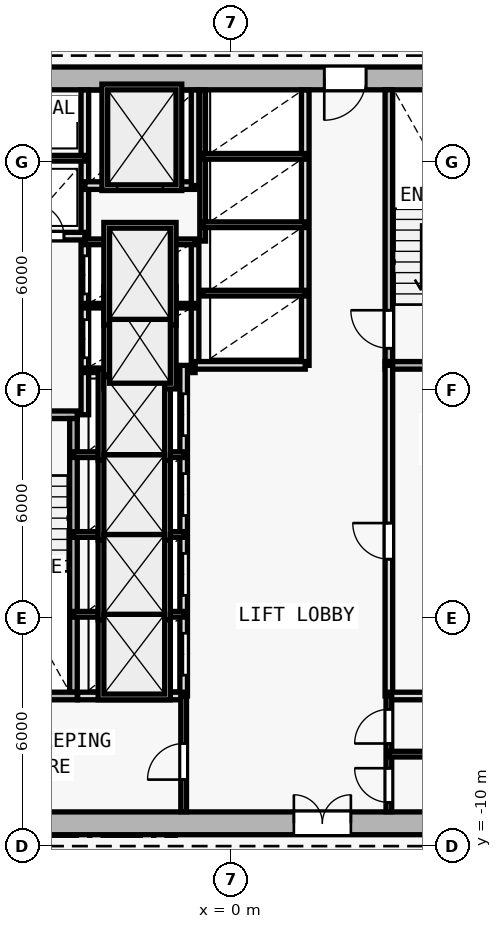
"""IFC4 building model, lengths in metres.
Left out: names, types, materials, properties, quantities, classifications, styles, units other than length and angle.
Written with IfcOpenShell. Run it as: python <this file> out.ifc"""

import sys

from ifc_helpers import new_model, si_unit, direction, frame, frame_2d, origin, origin_2d, place, context, subcontext, project, spatial, rectangle, i_section, extrude, element, fill, save


model = new_model("IFC4")
c1 = context("Model", 3, precision=1e-05, world=origin(), true_north=direction((0.0, 1.0)))
c2 = subcontext(c1, "Body", "Model", "MODEL_VIEW")
j1 = project(units=[si_unit("LENGTHUNIT", "METRE"), si_unit("PLANEANGLEUNIT", "RADIAN")], contexts=[c1])
p1 = place(None, origin())
s1 = spatial("IfcSite", under=j1, at=p1, CompositionType="ELEMENT")
p2 = place(p1, origin())
s2 = spatial("IfcBuilding", under=s1, at=p2, CompositionType="ELEMENT")
p3 = place(p2, frame((0.0, 0.0, 125.7)))
s3 = spatial("IfcBuildingStorey", under=s2, at=p3, CompositionType="ELEMENT", Elevation=125.7)
p4 = place(p3, frame((0.0, -9.4, 0.0), z_axis=(0.0, 0.0, 1.0), x_axis=(1.0, 0.0, 0.0)))
e1 = element("IfcColumn", 1, at=p4, inside=s3, PredefinedType="COLUMN", context=c2, shape_type="SweptSolid", body=[
    extrude(i_section(OverallWidth=0.409, OverallDepth=0.425, WebThickness=0.021, FlangeThickness=0.034, FilletRadius=0.015, at=origin_2d()), origin(), (0.0, 0.0, 1.0), 3.6),
])
p5 = place(p3, frame((-8.0, -9.4, 0.0), z_axis=(0.0, 0.0, 1.0), x_axis=(1.0, 0.0, 0.0)))
e2 = element("IfcWall", 2, at=p5, inside=s3, PredefinedType="SHEAR", context=c2, shape_type="SweptSolid", body=[
    extrude(rectangle(XDim=16.0, YDim=0.6, at=frame_2d((8.0, 0.0))), origin(), (0.0, 0.0, 1.0), 3.28),
])
p6 = place(p5, frame((9.65, 0.0, 0.0)))
e3 = element("IfcOpeningElement", 3, at=p6, cuts=e2, PredefinedType="OPENING", context=c2, shape_type="SweptSolid", body=[
    extrude(rectangle(XDim=1.5, YDim=2.2, at=frame_2d((0.75, 1.1))), frame((0.0, 0.31, 0.0), z_axis=(0.0, -1.0, 0.0), x_axis=(1.0, 0.0, 0.0)), (0.0, 0.0, 1.0), 0.62),
])
p7 = place(p3, frame((8.0, 10.2, 0.0), z_axis=(0.0, 0.0, 1.0), x_axis=(-1.0, 0.0, 0.0)))
e4 = element("IfcWall", 4, at=p7, inside=s3, PredefinedType="SHEAR", context=c2, shape_type="SweptSolid", body=[
    extrude(rectangle(XDim=16.0, YDim=0.6, at=frame_2d((8.0, 0.0))), origin(), (0.0, 0.0, 1.0), 3.28),
])
p8 = place(p7, frame((4.45, 0.0, 0.0)))
e5 = element("IfcOpeningElement", 5, at=p8, cuts=e4, PredefinedType="OPENING", context=c2, shape_type="SweptSolid", body=[
    extrude(rectangle(XDim=1.1, YDim=2.15, at=frame_2d((0.55, 1.075))), frame((0.0, 0.31, 0.0), z_axis=(0.0, -1.0, 0.0), x_axis=(1.0, 0.0, 0.0)), (0.0, 0.0, 1.0), 0.62),
])
p9 = place(p3, frame((-7.4, 1.35, 0.0), z_axis=(0.0, 0.0, 1.0), x_axis=(1.0, 0.0, 0.0)))
e6 = element("IfcWall", 6, at=p9, inside=s3, PredefinedType="SOLIDWALL", context=c2, shape_type="SweptSolid", body=[
    extrude(rectangle(XDim=3.35, YDim=0.2, at=frame_2d((1.675, 0.0))), origin(), (0.0, 0.0, 1.0), 3.28),
])
p10 = place(p9, frame((0.65, 0.0, 0.0)))
e7 = element("IfcOpeningElement", 7, at=p10, cuts=e6, PredefinedType="OPENING", context=c2, shape_type="SweptSolid", body=[
    extrude(rectangle(XDim=1.0, YDim=2.15, at=frame_2d((0.5, 1.075))), frame((0.0, 0.11, 0.0), z_axis=(0.0, -1.0, 0.0), x_axis=(1.0, 0.0, 0.0)), (0.0, 0.0, 1.0), 0.22),
])
p11 = place(p3, frame((-4.15, -5.95, 0.0), z_axis=(0.0, 0.0, 1.0), x_axis=(0.0, 1.0, 0.0)))
e8 = element("IfcWall", 8, at=p11, inside=s3, PredefinedType="SOLIDWALL", context=c2, shape_type="SweptSolid", body=[
    extrude(rectangle(XDim=7.2, YDim=0.2, at=frame_2d((3.6, 0.0))), origin(), (0.0, 0.0, 1.0), 3.28),
])
p12 = place(p3, frame((-3.85, 1.35, 0.0), z_axis=(0.0, 0.0, 1.0), x_axis=(0.0, 1.0, 0.0)))
e9 = element("IfcWall", 9, at=p12, inside=s3, PredefinedType="SOLIDWALL", context=c2, shape_type="SweptSolid", body=[
    extrude(rectangle(XDim=8.545, YDim=0.2, at=frame_2d((4.272, 0.0))), origin(), (0.0, 0.0, 1.0), 3.28),
])
p13 = place(p12, frame((1.5, 0.0, 0.0)))
e10 = element("IfcOpeningElement", 10, at=p13, cuts=e9, PredefinedType="OPENING", context=c2, shape_type="SweptSolid", body=[
    extrude(rectangle(XDim=1.0, YDim=2.15, at=frame_2d((0.5, 1.075))), frame((0.0, 0.11, 0.0), z_axis=(0.0, -1.0, 0.0), x_axis=(1.0, 0.0, 0.0)), (0.0, 0.0, 1.0), 0.22),
])
p14 = place(p12, frame((3.18, 0.0, 0.0)))
e11 = element("IfcOpeningElement", 11, at=p14, cuts=e9, PredefinedType="OPENING", context=c2, shape_type="SweptSolid", body=[
    extrude(rectangle(XDim=1.0, YDim=2.15, at=frame_2d((0.5, 1.075))), frame((0.0, 0.11, 0.0), z_axis=(0.0, -1.0, 0.0), x_axis=(1.0, 0.0, 0.0)), (0.0, 0.0, 1.0), 0.22),
])
p15 = place(p3, frame((-7.395, 6.05, 0.0), z_axis=(0.0, 0.0, 1.0), x_axis=(1.0, 0.0, 0.0)))
e12 = element("IfcWall", 12, at=p15, inside=s3, PredefinedType="SOLIDWALL", context=c2, shape_type="SweptSolid", body=[
    extrude(rectangle(XDim=3.545, YDim=0.2, at=frame_2d((1.772, 0.0))), origin(), (0.0, 0.0, 1.0), 3.28),
])
p16 = place(p15, frame((0.345, 0.0, 0.0)))
e13 = element("IfcOpeningElement", 13, at=p16, cuts=e12, PredefinedType="OPENING", context=c2, shape_type="SweptSolid", body=[
    extrude(rectangle(XDim=0.85, YDim=2.1, at=frame_2d((0.425, 1.05))), frame((0.0, 0.11, 0.0), z_axis=(0.0, -1.0, 0.0), x_axis=(1.0, 0.0, 0.0)), (0.0, 0.0, 1.0), 0.22),
])
p17 = place(p15, frame((2.145, 0.0, 0.0)))
e14 = element("IfcOpeningElement", 14, at=p17, cuts=e12, PredefinedType="OPENING", context=c2, shape_type="SweptSolid", body=[
    extrude(rectangle(XDim=0.85, YDim=2.1, at=frame_2d((0.425, 1.05))), frame((0.0, 0.11, 0.0), z_axis=(0.0, -1.0, 0.0), x_axis=(1.0, 0.0, 0.0)), (0.0, 0.0, 1.0), 0.22),
])
p18 = place(p3, frame((-7.395, 8.1, 0.0), z_axis=(0.0, 0.0, 1.0), x_axis=(1.0, 0.0, 0.0)))
e15 = element("IfcWall", 15, at=p18, inside=s3, PredefinedType="PARTITIONING", context=c2, shape_type="SweptSolid", body=[
    extrude(rectangle(XDim=3.545, YDim=0.15, at=frame_2d((1.772, 0.0))), origin(), (0.0, 0.0, 1.0), 3.28),
])
p19 = place(p3, frame((4.15, 2.75, 0.0), z_axis=(0.0, 0.0, 1.0), x_axis=(0.0, 1.0, 0.0)))
e16 = element("IfcWall", 16, at=p19, inside=s3, PredefinedType="SOLIDWALL", context=c2, shape_type="SweptSolid", body=[
    extrude(rectangle(XDim=7.15, YDim=0.2, at=frame_2d((3.575, 0.0))), origin(), (0.0, 0.0, 1.0), 3.28),
])
p20 = place(p19, frame((0.35, 0.0, 0.0)))
e17 = element("IfcOpeningElement", 17, at=p20, cuts=e16, PredefinedType="OPENING", context=c2, shape_type="SweptSolid", body=[
    extrude(rectangle(XDim=1.0, YDim=2.15, at=frame_2d((0.5, 1.075))), frame((0.0, 0.11, 0.0), z_axis=(0.0, -1.0, 0.0), x_axis=(1.0, 0.0, 0.0)), (0.0, 0.0, 1.0), 0.22),
])
p21 = place(p3, frame((4.05, 2.65, 0.0), z_axis=(0.0, 0.0, 1.0), x_axis=(1.0, 0.0, 0.0)))
e18 = element("IfcWall", 18, at=p21, inside=s3, PredefinedType="SOLIDWALL", context=c2, shape_type="SweptSolid", body=[
    extrude(rectangle(XDim=3.35, YDim=0.2, at=frame_2d((1.675, 0.0))), origin(), (0.0, 0.0, 1.0), 3.28),
])
p22 = place(p3, frame((-0.95, 2.65, 0.0), z_axis=(0.0, 0.0, 1.0), x_axis=(0.0, 1.0, 0.0)))
e19 = element("IfcWall", 19, at=p22, inside=s3, PredefinedType="SOLIDWALL", context=c2, shape_type="SweptSolid", body=[
    extrude(rectangle(XDim=3.27, YDim=0.2, at=frame_2d((1.635, 0.0))), origin(), (0.0, 0.0, 1.0), 3.28),
])
for number, where, z_axis, x_axis in (
    (20, (-3.85, 2.52, 0.0), (0.0, 0.0, 1.0), (1.0, 0.0, 0.0)),
    (21, (-3.85, 4.22, 0.0), (0.0, 0.0, 1.0), (1.0, 0.0, 0.0)),
):
    element("IfcWall", number, at=place(p3, frame(where, z_axis=z_axis, x_axis=x_axis)), inside=s3, PredefinedType="PARTITIONING", context=c2, shape_type="SweptSolid", body=[
        extrude(rectangle(XDim=2.9, YDim=0.12, at=frame_2d((1.45, 0.0))), origin(), (0.0, 0.0, 1.0), 3.28),
    ])
p23 = place(p3, frame((-3.85, 5.9, 0.0), z_axis=(0.0, 0.0, 1.0), x_axis=(1.0, 0.0, 0.0)))
e22 = element("IfcWall", 22, at=p23, inside=s3, PredefinedType="PARTITIONING", context=c2, shape_type="SweptSolid", body=[
    extrude(rectangle(XDim=2.9, YDim=0.15, at=frame_2d((1.45, 0.0))), origin(), (0.0, 0.0, 1.0), 3.28),
])
p24 = place(p3, frame((-3.85, 7.38, 0.0), z_axis=(0.0, 0.0, 1.0), x_axis=(1.0, 0.0, 0.0)))
e23 = element("IfcWall", 23, at=p24, inside=s3, PredefinedType="SOLIDWALL", context=c2, shape_type="SweptSolid", body=[
    extrude(rectangle(XDim=2.9, YDim=0.2, at=frame_2d((1.45, 0.0))), origin(), (0.0, 0.0, 1.0), 3.28),
])
p25 = place(p24, frame((0.85, 0.0, 0.0)))
e24 = element("IfcOpeningElement", 24, at=p25, cuts=e23, PredefinedType="OPENING", context=c2, shape_type="SweptSolid", body=[
    extrude(rectangle(XDim=1.2, YDim=2.2, at=frame_2d((0.6, 1.1))), frame((0.0, 0.11, 0.0), z_axis=(0.0, -1.0, 0.0), x_axis=(1.0, 0.0, 0.0)), (0.0, 0.0, 1.0), 0.22),
])
p26 = place(p3, frame((-0.95, 7.38, 0.0), z_axis=(0.0, 0.0, 1.0), x_axis=(0.0, 1.0, 0.0)))
e25 = element("IfcWall", 25, at=p26, inside=s3, PredefinedType="SOLIDWALL", context=c2, shape_type="SweptSolid", body=[
    extrude(rectangle(XDim=2.515, YDim=0.2, at=frame_2d((1.258, 0.0))), origin(), (0.0, 0.0, 1.0), 3.28),
])
p27 = place(p3, frame((4.15, -6.05, 0.0), z_axis=(0.0, 0.0, 1.0), x_axis=(0.0, 1.0, 0.0)))
e26 = element("IfcWall", 26, at=p27, inside=s3, PredefinedType="SOLIDWALL", context=c2, shape_type="SweptSolid", body=[
    extrude(rectangle(XDim=8.7, YDim=0.2, at=frame_2d((4.35, 0.0))), origin(), (0.0, 0.0, 1.0), 3.28),
])
p28 = place(p27, frame((3.6, 0.0, 0.0)))
e27 = element("IfcOpeningElement", 27, at=p28, cuts=e26, PredefinedType="OPENING", context=c2, shape_type="SweptSolid", body=[
    extrude(rectangle(XDim=0.95, YDim=2.1, at=frame_2d((0.475, 1.05))), frame((0.0, 0.11, 0.0), z_axis=(0.0, -1.0, 0.0), x_axis=(1.0, 0.0, 0.0)), (0.0, 0.0, 1.0), 0.22),
])
p29 = place(p3, frame((-1.25, -6.05, 0.0), z_axis=(0.0, 0.0, 1.0), x_axis=(0.0, 1.0, 0.0)))
e28 = element("IfcWall", 28, at=p29, inside=s3, PredefinedType="SOLIDWALL", context=c2, shape_type="SweptSolid", body=[
    extrude(rectangle(XDim=8.7, YDim=0.2, at=frame_2d((4.35, 0.0))), origin(), (0.0, 0.0, 1.0), 3.28),
])
p30 = place(p29, frame((0.55, 0.0, 0.0)))
e29 = element("IfcOpeningElement", 29, at=p30, cuts=e28, PredefinedType="OPENING", context=c2, shape_type="SweptSolid", body=[
    extrude(rectangle(XDim=1.1, YDim=2.15, at=frame_2d((0.55, 1.075))), frame((0.0, 0.11, 0.0), z_axis=(0.0, -1.0, 0.0), x_axis=(1.0, 0.0, 0.0)), (0.0, 0.0, 1.0), 0.22),
])
p31 = place(p29, frame((2.65, 0.0, 0.0)))
e30 = element("IfcOpeningElement", 30, at=p31, cuts=e28, PredefinedType="OPENING", context=c2, shape_type="SweptSolid", body=[
    extrude(rectangle(XDim=1.1, YDim=2.15, at=frame_2d((0.55, 1.075))), frame((0.0, 0.11, 0.0), z_axis=(0.0, -1.0, 0.0), x_axis=(1.0, 0.0, 0.0)), (0.0, 0.0, 1.0), 0.22),
])
p32 = place(p29, frame((4.75, 0.0, 0.0)))
e31 = element("IfcOpeningElement", 31, at=p32, cuts=e28, PredefinedType="OPENING", context=c2, shape_type="SweptSolid", body=[
    extrude(rectangle(XDim=1.1, YDim=2.15, at=frame_2d((0.55, 1.075))), frame((0.0, 0.11, 0.0), z_axis=(0.0, -1.0, 0.0), x_axis=(1.0, 0.0, 0.0)), (0.0, 0.0, 1.0), 0.22),
])
p33 = place(p29, frame((6.85, 0.0, 0.0)))
e32 = element("IfcOpeningElement", 32, at=p33, cuts=e28, PredefinedType="OPENING", context=c2, shape_type="SweptSolid", body=[
    extrude(rectangle(XDim=1.1, YDim=2.15, at=frame_2d((0.55, 1.075))), frame((0.0, 0.11, 0.0), z_axis=(0.0, -1.0, 0.0), x_axis=(1.0, 0.0, 0.0)), (0.0, 0.0, 1.0), 0.22),
])
for number, where, z_axis, x_axis in (
    (33, (-4.15, -3.9, 0.0), (0.0, 0.0, 1.0), (1.0, 0.0, 0.0)),
    (34, (-4.15, -1.8, 0.0), (0.0, 0.0, 1.0), (1.0, 0.0, 0.0)),
    (35, (-4.15, 0.3, 0.0), (0.0, 0.0, 1.0), (1.0, 0.0, 0.0)),
):
    element("IfcWall", number, at=place(p3, frame(where, z_axis=z_axis, x_axis=x_axis)), inside=s3, PredefinedType="PARTITIONING", context=c2, shape_type="SweptSolid", body=[
        extrude(rectangle(XDim=2.9, YDim=0.15, at=frame_2d((1.45, 0.0))), origin(), (0.0, 0.0, 1.0), 3.28),
    ])
p34 = place(p3, frame((1.95, 2.65, 0.0), z_axis=(0.0, 0.0, 1.0), x_axis=(0.0, 1.0, 0.0)))
e36 = element("IfcWall", 36, at=p34, inside=s3, PredefinedType="SOLIDWALL", context=c2, shape_type="SweptSolid", body=[
    extrude(rectangle(XDim=7.245, YDim=0.2, at=frame_2d((3.623, 0.0))), origin(), (0.0, 0.0, 1.0), 3.28),
])
p35 = place(p3, frame((-0.95, 2.65, 0.0), z_axis=(0.0, 0.0, 1.0), x_axis=(1.0, 0.0, 0.0)))
e37 = element("IfcWall", 37, at=p35, inside=s3, PredefinedType="SOLIDWALL", context=c2, shape_type="SweptSolid", body=[
    extrude(rectangle(XDim=2.9, YDim=0.2, at=frame_2d((1.45, 0.0))), origin(), (0.0, 0.0, 1.0), 3.28),
])
p36 = place(p3, frame((-0.75, 5.92, 0.0), z_axis=(0.0, 0.0, 1.0), x_axis=(0.0, 1.0, 0.0)))
e38 = element("IfcWall", 38, at=p36, inside=s3, PredefinedType="PARTITIONING", context=c2, shape_type="SweptSolid", body=[
    extrude(rectangle(XDim=3.975, YDim=0.15, at=frame_2d((1.988, 0.0))), origin(), (0.0, 0.0, 1.0), 3.28),
])
for number, where, z_axis, x_axis in (
    (39, (-0.75, 4.55, 0.0), (0.0, 0.0, 1.0), (1.0, 0.0, 0.0)),
    (40, (-0.75, 6.35, 0.0), (0.0, 0.0, 1.0), (1.0, 0.0, 0.0)),
    (41, (-0.75, 8.15, 0.0), (0.0, 0.0, 1.0), (1.0, 0.0, 0.0)),
):
    element("IfcWall", number, at=place(p3, frame(where, z_axis=z_axis, x_axis=x_axis)), inside=s3, PredefinedType="PARTITIONING", context=c2, shape_type="SweptSolid", body=[
        extrude(rectangle(XDim=2.7, YDim=0.15, at=frame_2d((1.35, 0.0))), origin(), (0.0, 0.0, 1.0), 3.28),
    ])
p37 = place(p3, frame((-7.4, -6.05, 0.0), z_axis=(0.0, 0.0, 1.0), x_axis=(1.0, 0.0, 0.0)))
e42 = element("IfcWall", 42, at=p37, inside=s3, PredefinedType="SOLIDWALL", context=c2, shape_type="SweptSolid", body=[
    extrude(rectangle(XDim=3.35, YDim=0.2, at=frame_2d((1.675, 0.0))), origin(), (0.0, 0.0, 1.0), 3.28),
])
p38 = place(p3, frame((-4.04, -6.05, 0.0), z_axis=(0.0, 0.0, 1.0), x_axis=(1.0, 0.0, 0.0)))
e43 = element("IfcWall", 43, at=p38, inside=s3, PredefinedType="SOLIDWALL", context=c2, shape_type="SweptSolid", body=[
    extrude(rectangle(XDim=2.79, YDim=0.2, at=frame_2d((1.395, 0.0))), origin(), (0.0, 0.0, 1.0), 3.28),
])
p39 = place(p3, frame((4.15, -6.05, 0.0), z_axis=(0.0, 0.0, 1.0), x_axis=(1.0, 0.0, 0.0)))
e44 = element("IfcWall", 44, at=p39, inside=s3, PredefinedType="SOLIDWALL", context=c2, shape_type="SweptSolid", body=[
    extrude(rectangle(XDim=3.245, YDim=0.2, at=frame_2d((1.623, 0.0))), origin(), (0.0, 0.0, 1.0), 3.28),
])
p40 = place(p3, frame((-1.25, -9.095, 0.0), z_axis=(0.0, 0.0, 1.0), x_axis=(0.0, 1.0, 0.0)))
e45 = element("IfcWall", 45, at=p40, inside=s3, PredefinedType="PARTITIONING", context=c2, shape_type="SweptSolid", body=[
    extrude(rectangle(XDim=3.045, YDim=0.15, at=frame_2d((1.522, 0.0))), origin(), (0.0, 0.0, 1.0), 3.28),
])
p41 = place(p40, frame((0.845, 0.0, 0.0)))
e46 = element("IfcOpeningElement", 46, at=p41, cuts=e45, PredefinedType="OPENING", context=c2, shape_type="SweptSolid", body=[
    extrude(rectangle(XDim=0.95, YDim=2.1, at=frame_2d((0.475, 1.05))), frame((0.0, 0.085, 0.0), z_axis=(0.0, -1.0, 0.0), x_axis=(1.0, 0.0, 0.0)), (0.0, 0.0, 1.0), 0.17),
])
p42 = place(p3, frame((4.15, -9.095, 0.0), z_axis=(0.0, 0.0, 1.0), x_axis=(0.0, 1.0, 0.0)))
e47 = element("IfcWall", 47, at=p42, inside=s3, PredefinedType="PARTITIONING", context=c2, shape_type="SweptSolid", body=[
    extrude(rectangle(XDim=3.045, YDim=0.15, at=frame_2d((1.522, 0.0))), origin(), (0.0, 0.0, 1.0), 3.28),
])
p43 = place(p42, frame((0.245, 0.0, 0.0)))
e48 = element("IfcOpeningElement", 48, at=p43, cuts=e47, PredefinedType="OPENING", context=c2, shape_type="SweptSolid", body=[
    extrude(rectangle(XDim=0.9, YDim=2.1, at=frame_2d((0.45, 1.05))), frame((0.0, 0.085, 0.0), z_axis=(0.0, -1.0, 0.0), x_axis=(1.0, 0.0, 0.0)), (0.0, 0.0, 1.0), 0.17),
])
p44 = place(p42, frame((1.795, 0.0, 0.0)))
e49 = element("IfcOpeningElement", 49, at=p44, cuts=e47, PredefinedType="OPENING", context=c2, shape_type="SweptSolid", body=[
    extrude(rectangle(XDim=0.9, YDim=2.1, at=frame_2d((0.45, 1.05))), frame((0.0, 0.085, 0.0), z_axis=(0.0, -1.0, 0.0), x_axis=(1.0, 0.0, 0.0)), (0.0, 0.0, 1.0), 0.17),
])
p45 = place(p3, frame((4.15, -7.58, 0.0), z_axis=(0.0, 0.0, 1.0), x_axis=(1.0, 0.0, 0.0)))
e50 = element("IfcWall", 50, at=p45, inside=s3, PredefinedType="PARTITIONING", context=c2, shape_type="SweptSolid", body=[
    extrude(rectangle(XDim=3.245, YDim=0.15, at=frame_2d((1.623, 0.0))), origin(), (0.0, 0.0, 1.0), 3.28),
])
p46 = place(p6, origin())
e51 = element("IfcDoor", 51, at=p46, inside=s3, OperationType="DOUBLE_DOOR_SINGLE_SWING", PredefinedType="DOOR", context=c2, shape_type="SweptSolid", body=[
    extrude(rectangle(XDim=1.5, YDim=2.2, at=frame_2d((0.75, 1.1))), frame((0.0, 0.025, 0.0), z_axis=(0.0, -1.0, 0.0), x_axis=(1.0, 0.0, 0.0)), (0.0, 0.0, 1.0), 0.05),
])
fill(e3, e51)
p47 = place(p8, origin())
e52 = element("IfcDoor", 52, at=p47, inside=s3, OperationType="SINGLE_SWING_RIGHT", PredefinedType="DOOR", context=c2, shape_type="SweptSolid", body=[
    extrude(rectangle(XDim=1.1, YDim=2.15, at=frame_2d((0.55, 1.075))), frame((0.0, 0.025, 0.0), z_axis=(0.0, -1.0, 0.0), x_axis=(1.0, 0.0, 0.0)), (0.0, 0.0, 1.0), 0.05),
])
fill(e5, e52)
p48 = place(p17, origin())
e53 = element("IfcDoor", 53, at=p48, inside=s3, OperationType="SINGLE_SWING_LEFT", PredefinedType="DOOR", context=c2, shape_type="SweptSolid", body=[
    extrude(rectangle(XDim=0.85, YDim=2.1, at=frame_2d((0.425, 1.05))), frame((0.0, 0.025, 0.0), z_axis=(0.0, -1.0, 0.0), x_axis=(1.0, 0.0, 0.0)), (0.0, 0.0, 1.0), 0.05),
])
fill(e14, e53)
p49 = place(p20, origin())
e54 = element("IfcDoor", 54, at=p49, inside=s3, OperationType="SINGLE_SWING_RIGHT", PredefinedType="DOOR", context=c2, shape_type="SweptSolid", body=[
    extrude(rectangle(XDim=1.0, YDim=2.15, at=frame_2d((0.5, 1.075))), frame((0.0, 0.025, 0.0), z_axis=(0.0, -1.0, 0.0), x_axis=(1.0, 0.0, 0.0)), (0.0, 0.0, 1.0), 0.05),
])
fill(e17, e54)
p50 = place(p25, origin())
e55 = element("IfcDoor", 55, at=p50, inside=s3, OperationType="DOUBLE_DOOR_SLIDING", PredefinedType="DOOR", context=c2, shape_type="SweptSolid", body=[
    extrude(rectangle(XDim=1.2, YDim=2.2, at=frame_2d((0.6, 1.1))), frame((0.0, 0.025, 0.0), z_axis=(0.0, -1.0, 0.0), x_axis=(1.0, 0.0, 0.0)), (0.0, 0.0, 1.0), 0.05),
])
fill(e24, e55)
p51 = place(p28, origin())
e56 = element("IfcDoor", 56, at=p51, inside=s3, OperationType="SINGLE_SWING_RIGHT", PredefinedType="DOOR", context=c2, shape_type="SweptSolid", body=[
    extrude(rectangle(XDim=0.95, YDim=2.1, at=frame_2d((0.475, 1.05))), frame((0.0, 0.025, 0.0), z_axis=(0.0, -1.0, 0.0), x_axis=(1.0, 0.0, 0.0)), (0.0, 0.0, 1.0), 0.05),
])
fill(e27, e56)
p52 = place(p30, origin())
e57 = element("IfcDoor", 57, at=p52, inside=s3, OperationType="DOUBLE_DOOR_SLIDING", PredefinedType="DOOR", context=c2, shape_type="SweptSolid", body=[
    extrude(rectangle(XDim=1.1, YDim=2.15, at=frame_2d((0.55, 1.075))), frame((0.0, 0.025, 0.0), z_axis=(0.0, -1.0, 0.0), x_axis=(1.0, 0.0, 0.0)), (0.0, 0.0, 1.0), 0.05),
])
fill(e29, e57)
p53 = place(p31, origin())
e58 = element("IfcDoor", 58, at=p53, inside=s3, OperationType="DOUBLE_DOOR_SLIDING", PredefinedType="DOOR", context=c2, shape_type="SweptSolid", body=[
    extrude(rectangle(XDim=1.1, YDim=2.15, at=frame_2d((0.55, 1.075))), frame((0.0, 0.025, 0.0), z_axis=(0.0, -1.0, 0.0), x_axis=(1.0, 0.0, 0.0)), (0.0, 0.0, 1.0), 0.05),
])
fill(e30, e58)
p54 = place(p32, origin())
e59 = element("IfcDoor", 59, at=p54, inside=s3, OperationType="DOUBLE_DOOR_SLIDING", PredefinedType="DOOR", context=c2, shape_type="SweptSolid", body=[
    extrude(rectangle(XDim=1.1, YDim=2.15, at=frame_2d((0.55, 1.075))), frame((0.0, 0.025, 0.0), z_axis=(0.0, -1.0, 0.0), x_axis=(1.0, 0.0, 0.0)), (0.0, 0.0, 1.0), 0.05),
])
fill(e31, e59)
p55 = place(p33, origin())
e60 = element("IfcDoor", 60, at=p55, inside=s3, OperationType="DOUBLE_DOOR_SLIDING", PredefinedType="DOOR", context=c2, shape_type="SweptSolid", body=[
    extrude(rectangle(XDim=1.1, YDim=2.15, at=frame_2d((0.55, 1.075))), frame((0.0, 0.025, 0.0), z_axis=(0.0, -1.0, 0.0), x_axis=(1.0, 0.0, 0.0)), (0.0, 0.0, 1.0), 0.05),
])
fill(e32, e60)
p56 = place(p13, origin())
e61 = element("IfcDoor", 61, at=p56, inside=s3, OperationType="DOUBLE_DOOR_SLIDING", PredefinedType="DOOR", context=c2, shape_type="SweptSolid", body=[
    extrude(rectangle(XDim=1.0, YDim=2.15, at=frame_2d((0.5, 1.075))), frame((0.0, 0.025, 0.0), z_axis=(0.0, -1.0, 0.0), x_axis=(1.0, 0.0, 0.0)), (0.0, 0.0, 1.0), 0.05),
])
fill(e10, e61)
p57 = place(p14, origin())
e62 = element("IfcDoor", 62, at=p57, inside=s3, OperationType="DOUBLE_DOOR_SLIDING", PredefinedType="DOOR", context=c2, shape_type="SweptSolid", body=[
    extrude(rectangle(XDim=1.0, YDim=2.15, at=frame_2d((0.5, 1.075))), frame((0.0, 0.025, 0.0), z_axis=(0.0, -1.0, 0.0), x_axis=(1.0, 0.0, 0.0)), (0.0, 0.0, 1.0), 0.05),
])
fill(e11, e62)
p58 = place(p41, origin())
e63 = element("IfcDoor", 63, at=p58, inside=s3, OperationType="SINGLE_SWING_LEFT", PredefinedType="DOOR", context=c2, shape_type="SweptSolid", body=[
    extrude(rectangle(XDim=0.95, YDim=2.1, at=frame_2d((0.475, 1.05))), frame((0.0, 0.025, 0.0), z_axis=(0.0, -1.0, 0.0), x_axis=(1.0, 0.0, 0.0)), (0.0, 0.0, 1.0), 0.05),
])
fill(e46, e63)
p59 = place(p43, origin())
e64 = element("IfcDoor", 64, at=p59, inside=s3, OperationType="SINGLE_SWING_RIGHT", PredefinedType="DOOR", context=c2, shape_type="SweptSolid", body=[
    extrude(rectangle(XDim=0.9, YDim=2.1, at=frame_2d((0.45, 1.05))), frame((0.0, 0.025, 0.0), z_axis=(0.0, -1.0, 0.0), x_axis=(1.0, 0.0, 0.0)), (0.0, 0.0, 1.0), 0.05),
])
fill(e48, e64)
p60 = place(p44, origin())
e65 = element("IfcDoor", 65, at=p60, inside=s3, OperationType="SINGLE_SWING_LEFT", PredefinedType="DOOR", context=c2, shape_type="SweptSolid", body=[
    extrude(rectangle(XDim=0.9, YDim=2.1, at=frame_2d((0.45, 1.05))), frame((0.0, 0.025, 0.0), z_axis=(0.0, -1.0, 0.0), x_axis=(1.0, 0.0, 0.0)), (0.0, 0.0, 1.0), 0.05),
])
fill(e49, e65)
save(model, sys.argv[1])
